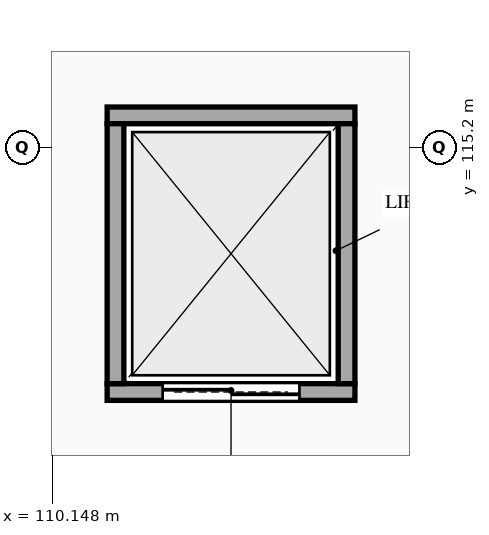
"""IFC4 building model, lengths in metres.
Left out: names, types, materials, properties, quantities, classifications, styles, units other than length and angle.
Written with IfcOpenShell. Run it as: python <this file> out.ifc"""

import sys

from ifc_helpers import new_model, si_unit, direction, frame, frame_2d, origin, place, context, subcontext, project, spatial, rectangle, extrude, element, fill, save


model = new_model("IFC4")
c1 = context("Model", 3, precision=1e-05, world=origin(), true_north=direction((0.0, 1.0)))
c2 = subcontext(c1, "Body", "Model", "MODEL_VIEW")
j1 = project(units=[si_unit("LENGTHUNIT", "METRE"), si_unit("PLANEANGLEUNIT", "RADIAN")], contexts=[c1])
p1 = place(None, origin())
s1 = spatial("IfcSite", under=j1, at=p1, CompositionType="ELEMENT")
p2 = place(p1, origin())
s2 = spatial("IfcBuilding", under=s1, at=p2, CompositionType="ELEMENT")
p3 = place(p2, origin())
s3 = spatial("IfcBuildingStorey", under=s2, at=p3, CompositionType="ELEMENT", Elevation=0.0)
p4 = place(p3, frame((110.87, 111.98, 0.0), z_axis=(0.0, 0.0, 1.0), x_axis=(1.0, 0.0, 0.0)))
e1 = element("IfcWall", 1, at=p4, inside=s3, PredefinedType="STANDARD", context=c2, shape_type="SweptSolid", body=[
    extrude(rectangle(XDim=3.26, YDim=0.22, at=frame_2d((1.63, 0.0))), origin(), (0.0, 0.0, 1.0), 5.08),
])
p5 = place(p4, frame((0.73, 0.0, 0.0)))
e2 = element("IfcOpeningElement", 2, at=p5, cuts=e1, PredefinedType="OPENING", context=c2, shape_type="SweptSolid", body=[
    extrude(rectangle(XDim=1.8, YDim=2.35, at=frame_2d((0.9, 1.175))), frame((0.0, 0.12, 0.0), z_axis=(0.0, -1.0, 0.0), x_axis=(1.0, 0.0, 0.0)), (0.0, 0.0, 1.0), 0.24),
])
p6 = place(p3, frame((114.13, 115.62, 0.0), z_axis=(0.0, 0.0, 1.0), x_axis=(-1.0, 0.0, 0.0)))
e3 = element("IfcWall", 3, at=p6, inside=s3, PredefinedType="STANDARD", context=c2, shape_type="SweptSolid", body=[
    extrude(rectangle(XDim=3.26, YDim=0.22, at=frame_2d((1.63, 0.0))), origin(), (0.0, 0.0, 1.0), 5.08),
])
for number, where, z_axis, x_axis in (
    (4, (110.98, 115.51, 0.0), (0.0, 0.0, 1.0), (0.0, -1.0, 0.0)),
    (5, (114.02, 112.09, 0.0), (0.0, 0.0, 1.0), (0.0, 1.0, 0.0)),
):
    element("IfcWall", number, at=place(p3, frame(where, z_axis=z_axis, x_axis=x_axis)), inside=s3, PredefinedType="STANDARD", context=c2, shape_type="SweptSolid", body=[
        extrude(rectangle(XDim=3.42, YDim=0.22, at=frame_2d((1.71, 0.0))), origin(), (0.0, 0.0, 1.0), 5.08),
    ])
p7 = place(p5, origin())
e6 = element("IfcDoor", 6, at=p7, inside=s3, OperationType="DOUBLE_DOOR_SLIDING", PredefinedType="DOOR", context=c2, shape_type="SweptSolid", body=[
    extrude(rectangle(XDim=1.8, YDim=2.35, at=frame_2d((0.9, 1.175))), frame((0.0, 0.025, 0.0), z_axis=(0.0, -1.0, 0.0), x_axis=(1.0, 0.0, 0.0)), (0.0, 0.0, 1.0), 0.05),
])
fill(e2, e6)
save(model, sys.argv[1])
